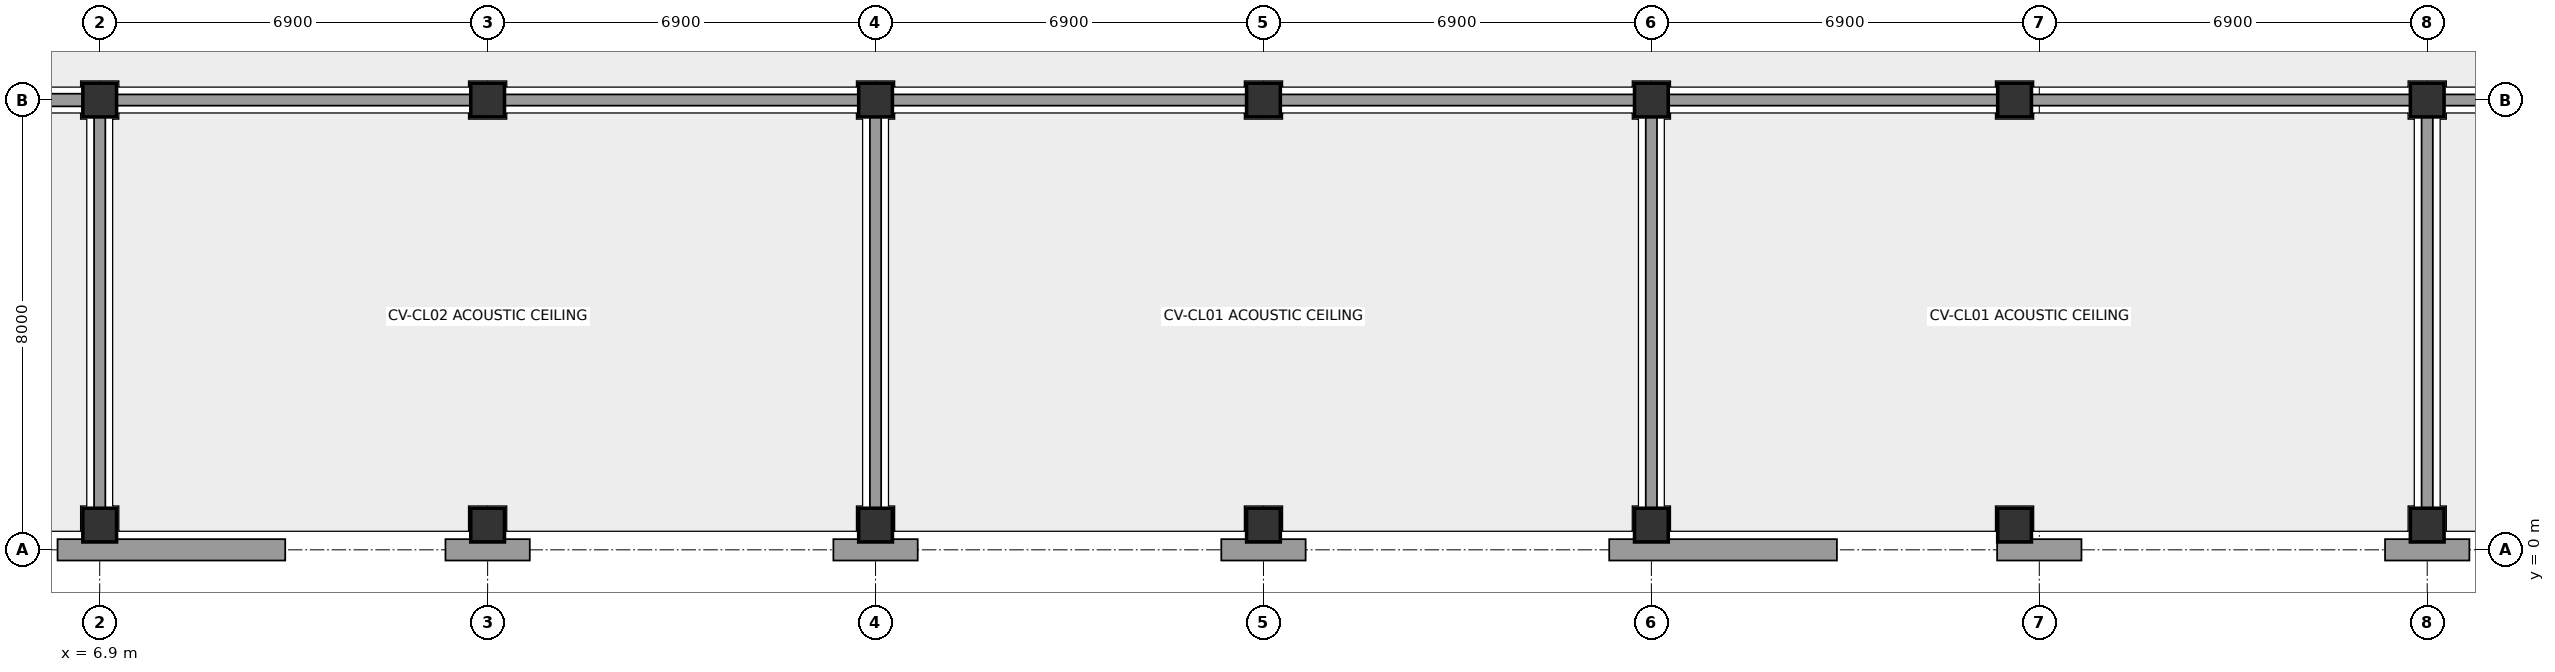
"""IFC4 building model, lengths in metres.
Left out: names, types, materials, properties, quantities, classifications, styles, units other than length and angle.
Written with IfcOpenShell. Run it as: python <this file> out.ifc"""

import sys

from ifc_helpers import new_model, si_unit, direction, frame, frame_2d, origin, origin_with_axes, origin_2d, place, context, subcontext, project, spatial, rectangle, extrude, element, fill, save


model = new_model("IFC4")
c1 = context("Model", 3, precision=1e-05, world=origin(), true_north=direction((0.0, 1.0)))
c2 = subcontext(c1, "Body", "Model", "MODEL_VIEW")
j1 = project(units=[si_unit("LENGTHUNIT", "METRE"), si_unit("PLANEANGLEUNIT", "RADIAN")], contexts=[c1])
p1 = place(None, origin())
s1 = spatial("IfcSite", under=j1, at=p1, CompositionType="ELEMENT")
p2 = place(p1, origin())
s2 = spatial("IfcBuilding", under=s1, at=p2, CompositionType="ELEMENT")
p3 = place(p2, origin())
s3 = spatial("IfcBuildingStorey", under=s2, at=p3, CompositionType="ELEMENT", Elevation=0.0)
for number, where, z_axis, x_axis in (
    (1, (6.9, 0.44, 0.0), (0.0, 0.0, 1.0), (1.0, 0.0, 0.0)),
    (2, (6.9, 8.0, 0.0), (0.0, 0.0, 1.0), (1.0, 0.0, 0.0)),
    (3, (13.8, 0.44, 0.0), (0.0, 0.0, 1.0), (1.0, 0.0, 0.0)),
    (4, (13.8, 8.0, 0.0), (0.0, 0.0, 1.0), (1.0, 0.0, 0.0)),
    (5, (20.7, 0.44, 0.0), (0.0, 0.0, 1.0), (1.0, 0.0, 0.0)),
    (6, (20.7, 8.0, 0.0), (0.0, 0.0, 1.0), (1.0, 0.0, 0.0)),
    (7, (27.6, 0.44, 0.0), (0.0, 0.0, 1.0), (1.0, 0.0, 0.0)),
    (8, (27.6, 8.0, 0.0), (0.0, 0.0, 1.0), (1.0, 0.0, 0.0)),
    (9, (34.5, 0.44, 0.0), (0.0, 0.0, 1.0), (1.0, 0.0, 0.0)),
    (10, (34.5, 8.0, 0.0), (0.0, 0.0, 1.0), (1.0, 0.0, 0.0)),
    (11, (40.96, 0.44, 0.0), (0.0, 0.0, 1.0), (1.0, 0.0, 0.0)),
    (12, (40.96, 8.0, 0.0), (0.0, 0.0, 1.0), (1.0, 0.0, 0.0)),
    (13, (48.3, 0.44, 0.0), (0.0, 0.0, 1.0), (1.0, 0.0, 0.0)),
    (14, (48.3, 8.0, 0.0), (0.0, 0.0, 1.0), (1.0, 0.0, 0.0)),
):
    element("IfcColumn", number, at=place(p3, frame(where, z_axis=z_axis, x_axis=x_axis)), inside=s3, PredefinedType="COLUMN", context=c2, shape_type="SweptSolid", body=[
        extrude(rectangle(XDim=0.6, YDim=0.6, at=origin_2d()), origin(), (0.0, 0.0, 1.0), 4.4),
    ])
p4 = place(p3, frame((6.15, 0.0, 0.0), z_axis=(0.0, 0.0, 1.0), x_axis=(1.0, 0.0, 0.0)))
e15 = element("IfcWall", 15, at=p4, inside=s3, PredefinedType="STANDARD", context=c2, shape_type="SweptSolid", body=[
    extrude(rectangle(XDim=4.05, YDim=0.38, at=frame_2d((2.025, 0.0))), origin(), (0.0, 0.0, 1.0), 4.12),
])
p5 = place(p4, frame((1.9, 0.0, 0.0)))
e16 = element("IfcOpeningElement", 16, at=p5, cuts=e15, PredefinedType="OPENING", context=c2, shape_type="SweptSolid", body=[
    extrude(rectangle(XDim=1.8, YDim=2.4, at=frame_2d((0.9, 1.2))), frame((0.0, 0.202, 0.0), z_axis=(0.0, -1.0, 0.0), x_axis=(1.0, 0.0, 0.0)), (0.0, 0.0, 1.0), 0.404),
])
for number, where, z_axis, x_axis in (
    (17, (13.05, 0.0, 0.0), (0.0, 0.0, 1.0), (1.0, 0.0, 0.0)),
    (18, (19.95, 0.0, 0.0), (0.0, 0.0, 1.0), (1.0, 0.0, 0.0)),
    (19, (26.85, 0.0, 0.0), (0.0, 0.0, 1.0), (1.0, 0.0, 0.0)),
):
    element("IfcWall", number, at=place(p3, frame(where, z_axis=z_axis, x_axis=x_axis)), inside=s3, PredefinedType="STANDARD", context=c2, shape_type="SweptSolid", body=[
        extrude(rectangle(XDim=1.5, YDim=0.38, at=frame_2d((0.75, 0.0))), origin(), (0.0, 0.0, 1.0), 4.12),
    ])
p6 = place(p3, frame((33.75, 0.0, 0.0), z_axis=(0.0, 0.0, 1.0), x_axis=(1.0, 0.0, 0.0)))
e20 = element("IfcWall", 20, at=p6, inside=s3, PredefinedType="STANDARD", context=c2, shape_type="SweptSolid", body=[
    extrude(rectangle(XDim=4.05, YDim=0.38, at=frame_2d((2.025, 0.0))), origin(), (0.0, 0.0, 1.0), 4.12),
])
p7 = place(p6, frame((1.9, 0.0, 0.0)))
e21 = element("IfcOpeningElement", 21, at=p7, cuts=e20, PredefinedType="OPENING", context=c2, shape_type="SweptSolid", body=[
    extrude(rectangle(XDim=1.8, YDim=2.4, at=frame_2d((0.9, 1.2))), frame((0.0, 0.202, 0.0), z_axis=(0.0, -1.0, 0.0), x_axis=(1.0, 0.0, 0.0)), (0.0, 0.0, 1.0), 0.404),
])
for number, where, z_axis, x_axis in (
    (22, (40.65, 0.0, 0.0), (0.0, 0.0, 1.0), (1.0, 0.0, 0.0)),
    (23, (47.55, 0.0, 0.0), (0.0, 0.0, 1.0), (1.0, 0.0, 0.0)),
):
    element("IfcWall", number, at=place(p3, frame(where, z_axis=z_axis, x_axis=x_axis)), inside=s3, PredefinedType="STANDARD", context=c2, shape_type="SweptSolid", body=[
        extrude(rectangle(XDim=1.5, YDim=0.38, at=frame_2d((0.75, 0.0))), origin(), (0.0, 0.0, 1.0), 4.12),
    ])
p8 = place(p3, frame((0.3, 8.0, 0.0), z_axis=(0.0, 0.0, 1.0), x_axis=(1.0, 0.0, 0.0)))
e24 = element("IfcWall", 24, at=p8, inside=s3, PredefinedType="PARTITIONING", context=c2, shape_type="SweptSolid", body=[
    extrude(rectangle(XDim=6.45, YDim=0.225, at=frame_2d((3.225, 0.0))), origin(), (0.0, 0.0, 1.0), 3.56),
])
p9 = place(p8, frame((2.0, 0.0, 0.0)))
e25 = element("IfcOpeningElement", 25, at=p9, cuts=e24, PredefinedType="OPENING", context=c2, shape_type="SweptSolid", body=[
    extrude(rectangle(XDim=1.0, YDim=2.15, at=frame_2d((0.5, 1.075))), frame((0.0, 0.125, 0.0), z_axis=(0.0, -1.0, 0.0), x_axis=(1.0, 0.0, 0.0)), (0.0, 0.0, 1.0), 0.249),
])
p10 = place(p3, frame((6.9, 0.25, 0.0), z_axis=(0.0, 0.0, 1.0), x_axis=(0.0, 1.0, 0.0)))
e26 = element("IfcWall", 26, at=p10, inside=s3, PredefinedType="PARTITIONING", context=c2, shape_type="SweptSolid", body=[
    extrude(rectangle(XDim=7.6, YDim=0.2, at=frame_2d((3.8, 0.0))), origin(), (0.0, 0.0, 1.0), 3.56),
])
p11 = place(p3, frame((7.05, 8.0, 0.0), z_axis=(0.0, 0.0, 1.0), x_axis=(1.0, 0.0, 0.0)))
e27 = element("IfcWall", 27, at=p11, inside=s3, PredefinedType="PARTITIONING", context=c2, shape_type="SweptSolid", body=[
    extrude(rectangle(XDim=13.5, YDim=0.2, at=frame_2d((6.75, 0.0))), origin(), (0.0, 0.0, 1.0), 3.56),
])
p12 = place(p11, frame((2.0, 0.0, 0.0)))
e28 = element("IfcOpeningElement", 28, at=p12, cuts=e27, PredefinedType="OPENING", context=c2, shape_type="SweptSolid", body=[
    extrude(rectangle(XDim=1.0, YDim=2.15, at=frame_2d((0.5, 1.075))), frame((0.0, 0.112, 0.0), z_axis=(0.0, -1.0, 0.0), x_axis=(1.0, 0.0, 0.0)), (0.0, 0.0, 1.0), 0.224),
])
p13 = place(p3, frame((20.7, 0.25, 0.0), z_axis=(0.0, 0.0, 1.0), x_axis=(0.0, 1.0, 0.0)))
e29 = element("IfcWall", 29, at=p13, inside=s3, PredefinedType="PARTITIONING", context=c2, shape_type="SweptSolid", body=[
    extrude(rectangle(XDim=7.6, YDim=0.2, at=frame_2d((3.8, 0.0))), origin(), (0.0, 0.0, 1.0), 4.12),
])
p14 = place(p3, frame((20.85, 8.0, 0.0), z_axis=(0.0, 0.0, 1.0), x_axis=(1.0, 0.0, 0.0)))
e30 = element("IfcWall", 30, at=p14, inside=s3, PredefinedType="PARTITIONING", context=c2, shape_type="SweptSolid", body=[
    extrude(rectangle(XDim=13.5, YDim=0.2, at=frame_2d((6.75, 0.0))), origin(), (0.0, 0.0, 1.0), 3.56),
])
p15 = place(p14, frame((2.0, 0.0, 0.0)))
e31 = element("IfcOpeningElement", 31, at=p15, cuts=e30, PredefinedType="OPENING", context=c2, shape_type="SweptSolid", body=[
    extrude(rectangle(XDim=1.0, YDim=2.15, at=frame_2d((0.5, 1.075))), frame((0.0, 0.112, 0.0), z_axis=(0.0, -1.0, 0.0), x_axis=(1.0, 0.0, 0.0)), (0.0, 0.0, 1.0), 0.224),
])
p16 = place(p3, frame((34.5, 0.25, 0.0), z_axis=(0.0, 0.0, 1.0), x_axis=(0.0, 1.0, 0.0)))
e32 = element("IfcWall", 32, at=p16, inside=s3, PredefinedType="PARTITIONING", context=c2, shape_type="SweptSolid", body=[
    extrude(rectangle(XDim=7.6, YDim=0.2, at=frame_2d((3.8, 0.0))), origin(), (0.0, 0.0, 1.0), 4.12),
])
p17 = place(p3, frame((34.65, 8.0, 0.0), z_axis=(0.0, 0.0, 1.0), x_axis=(1.0, 0.0, 0.0)))
e33 = element("IfcWall", 33, at=p17, inside=s3, PredefinedType="PARTITIONING", context=c2, shape_type="SweptSolid", body=[
    extrude(rectangle(XDim=13.5, YDim=0.2, at=frame_2d((6.75, 0.0))), origin(), (0.0, 0.0, 1.0), 3.56),
])
p18 = place(p17, frame((2.0, 0.0, 0.0)))
e34 = element("IfcOpeningElement", 34, at=p18, cuts=e33, PredefinedType="OPENING", context=c2, shape_type="SweptSolid", body=[
    extrude(rectangle(XDim=1.0, YDim=2.15, at=frame_2d((0.5, 1.075))), frame((0.0, 0.112, 0.0), z_axis=(0.0, -1.0, 0.0), x_axis=(1.0, 0.0, 0.0)), (0.0, 0.0, 1.0), 0.224),
])
p19 = place(p3, frame((48.3, 0.25, 0.0), z_axis=(0.0, 0.0, 1.0), x_axis=(0.0, 1.0, 0.0)))
e35 = element("IfcWall", 35, at=p19, inside=s3, PredefinedType="PARTITIONING", context=c2, shape_type="SweptSolid", body=[
    extrude(rectangle(XDim=7.6, YDim=0.2, at=frame_2d((3.8, 0.0))), origin(), (0.0, 0.0, 1.0), 3.56),
])
p20 = place(p3, frame((48.45, 8.0, 0.0), z_axis=(0.0, 0.0, 1.0), x_axis=(1.0, 0.0, 0.0)))
e36 = element("IfcWall", 36, at=p20, inside=s3, PredefinedType="PARTITIONING", context=c2, shape_type="SweptSolid", body=[
    extrude(rectangle(XDim=6.45, YDim=0.2, at=frame_2d((3.225, 0.0))), origin(), (0.0, 0.0, 1.0), 3.56),
])
p21 = place(p20, frame((2.0, 0.0, 0.0)))
e37 = element("IfcOpeningElement", 37, at=p21, cuts=e36, PredefinedType="OPENING", context=c2, shape_type="SweptSolid", body=[
    extrude(rectangle(XDim=1.0, YDim=2.15, at=frame_2d((0.5, 1.075))), frame((0.0, 0.112, 0.0), z_axis=(0.0, -1.0, 0.0), x_axis=(1.0, 0.0, 0.0)), (0.0, 0.0, 1.0), 0.224),
])
p22 = place(p5, frame((1.8, 0.0, 0.0), z_axis=(0.0, 0.0, 1.0), x_axis=(-1.0, 0.0, 0.0)))
e38 = element("IfcDoor", 38, at=p22, inside=s3, OperationType="DOUBLE_DOOR_SINGLE_SWING", PredefinedType="DOOR", context=c2, shape_type="SweptSolid", body=[
    extrude(rectangle(XDim=1.8, YDim=2.4, at=frame_2d((0.9, 1.2))), frame((0.0, 0.025, 0.0), z_axis=(0.0, -1.0, 0.0), x_axis=(1.0, 0.0, 0.0)), (0.0, 0.0, 1.0), 0.05),
])
fill(e16, e38)
p23 = place(p7, frame((1.8, 0.0, 0.0), z_axis=(0.0, 0.0, 1.0), x_axis=(-1.0, 0.0, 0.0)))
e39 = element("IfcDoor", 39, at=p23, inside=s3, OperationType="DOUBLE_DOOR_SINGLE_SWING", PredefinedType="DOOR", context=c2, shape_type="SweptSolid", body=[
    extrude(rectangle(XDim=1.8, YDim=2.4, at=frame_2d((0.9, 1.2))), frame((0.0, 0.025, 0.0), z_axis=(0.0, -1.0, 0.0), x_axis=(1.0, 0.0, 0.0)), (0.0, 0.0, 1.0), 0.05),
])
fill(e21, e39)
p24 = place(p12, origin_with_axes())
e40 = element("IfcDoor", 40, at=p24, inside=s3, OperationType="SINGLE_SWING_RIGHT", PredefinedType="DOOR", context=c2, shape_type="SweptSolid", body=[
    extrude(rectangle(XDim=1.0, YDim=2.15, at=frame_2d((0.5, 1.075))), frame((0.0, 0.025, 0.0), z_axis=(0.0, -1.0, 0.0), x_axis=(1.0, 0.0, 0.0)), (0.0, 0.0, 1.0), 0.05),
])
fill(e28, e40)
p25 = place(p15, frame((1.0, 0.0, 0.0), z_axis=(0.0, 0.0, 1.0), x_axis=(-1.0, 0.0, 0.0)))
e41 = element("IfcDoor", 41, at=p25, inside=s3, OperationType="SINGLE_SWING_LEFT", PredefinedType="DOOR", context=c2, shape_type="SweptSolid", body=[
    extrude(rectangle(XDim=1.0, YDim=2.15, at=frame_2d((0.5, 1.075))), frame((0.0, 0.025, 0.0), z_axis=(0.0, -1.0, 0.0), x_axis=(1.0, 0.0, 0.0)), (0.0, 0.0, 1.0), 0.05),
])
fill(e31, e41)
p26 = place(p18, origin_with_axes())
e42 = element("IfcDoor", 42, at=p26, inside=s3, OperationType="SINGLE_SWING_RIGHT", PredefinedType="DOOR", context=c2, shape_type="SweptSolid", body=[
    extrude(rectangle(XDim=1.0, YDim=2.15, at=frame_2d((0.5, 1.075))), frame((0.0, 0.025, 0.0), z_axis=(0.0, -1.0, 0.0), x_axis=(1.0, 0.0, 0.0)), (0.0, 0.0, 1.0), 0.05),
])
fill(e34, e42)
save(model, sys.argv[1])
